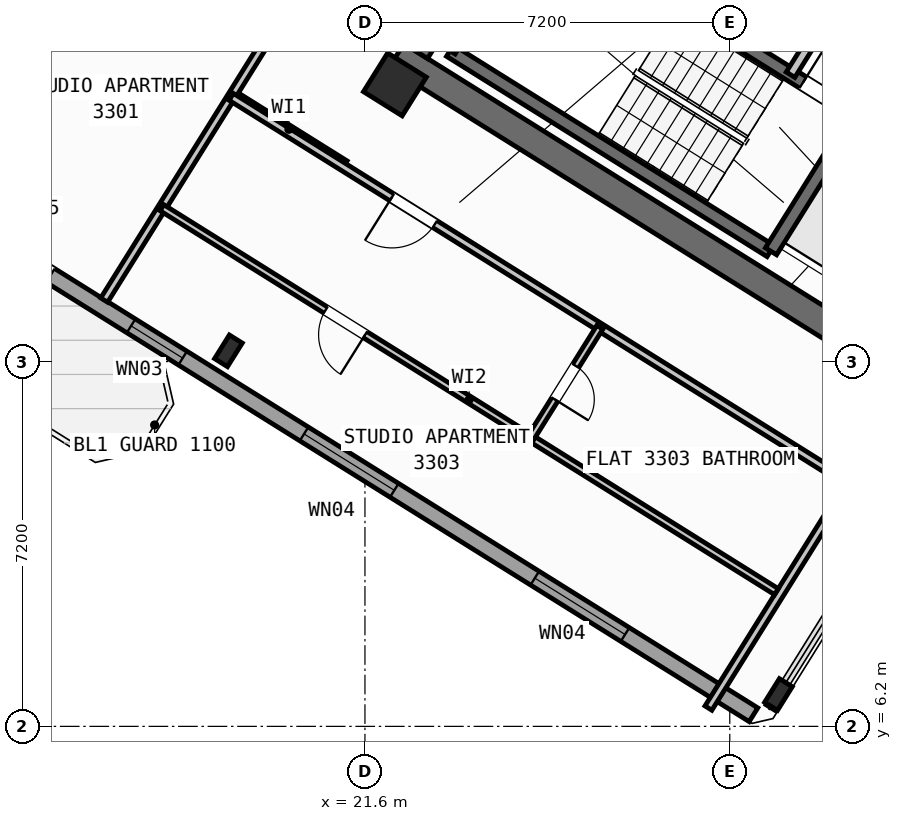
"""IFC4 building model, lengths in metres.
Left out: names, types, materials, properties, quantities, classifications, styles, units other than length and angle.
Written with IfcOpenShell. Run it as: python <this file> out.ifc"""

import sys

from ifc_helpers import new_model, si_unit, direction, frame, frame_2d, origin, origin_2d, place, context, subcontext, project, spatial, rectangle, hollow_rectangle, i_section, extrude, source, transform, mapped, element, fill, save


model = new_model("IFC4")
c1 = context("Model", 3, precision=1e-05, world=origin(), true_north=direction((0.0, 1.0)))
c2 = subcontext(c1, "Body", "Model", "MODEL_VIEW")
j1 = project(units=[si_unit("LENGTHUNIT", "METRE"), si_unit("PLANEANGLEUNIT", "RADIAN")], contexts=[c1])
p1 = place(None, origin())
s1 = spatial("IfcSite", under=j1, at=p1, CompositionType="ELEMENT")
p2 = place(p1, origin())
s2 = spatial("IfcBuilding", under=s1, at=p2, CompositionType="ELEMENT")
p3 = place(p2, frame((0.0, 0.0, 132.6)))
s3 = spatial("IfcBuildingStorey", under=s2, at=p3, CompositionType="ELEMENT", Elevation=132.6)
p4 = place(p3, frame((33.366, 12.477, 0.0), z_axis=(0.0, 0.0, 1.0), x_axis=(-0.848047359947, 0.529920442413, 0.0)))
e1 = element("IfcWall", 1, at=p4, inside=s3, PredefinedType="SHEAR", context=c2, shape_type="SweptSolid", body=[
    extrude(rectangle(XDim=13.14, YDim=0.55, at=frame_2d((6.57, 0.0))), origin(), (0.0, 0.0, 1.0), 3.32),
])
p5 = place(p3, frame((26.007, 24.976, 0.0), z_axis=(0.0, 0.0, 1.0), x_axis=(-0.529923795287, -0.848045264823, 0.0)))
e2 = element("IfcWall", 2, at=p5, inside=s3, PredefinedType="SHEAR", context=c2, shape_type="SweptSolid", body=[
    extrude(rectangle(XDim=6.425, YDim=0.55, at=frame_2d((3.212, 0.0))), origin(), (0.0, 0.0, 1.0), 3.32),
])
m1 = source(origin(), c2, "Body", "SweptSolid", [
    extrude(i_section(OverallWidth=0.3, OverallDepth=0.55, WebThickness=0.015, FlangeThickness=0.029, at=origin_2d()), origin(), (0.0, 0.0, 1.0), 3.6),
])
p6 = place(p3, frame((29.761, 6.829, 0.0), z_axis=(0.0, 0.0, 1.0), x_axis=(-0.848048096156, 0.529919264233, 0.0)))
e3 = element("IfcColumn", 3, at=p6, inside=s3, PredefinedType="COLUMN", context=c2, shape_type="MappedRepresentation", body=[
    mapped(m1, transform((0.0, 0.0, 0.0), scale=1.0)),
])
m2 = source(origin(), c2, "Body", "SweptSolid", [
    extrude(hollow_rectangle(XDim=0.9, YDim=0.9, WallThickness=0.036, at=origin_2d()), origin(), (0.0, 0.0, 1.0), 3.6),
])
p7 = place(p3, frame((22.191, 18.87, 0.0), z_axis=(0.0, 0.0, 1.0), x_axis=(-0.848048096156, 0.529919264233, 0.0)))
e4 = element("IfcColumn", 4, at=p7, inside=s3, PredefinedType="COLUMN", context=c2, shape_type="MappedRepresentation", body=[
    mapped(m2, transform((0.0, 0.0, 0.0), scale=1.0)),
])
p8 = place(p3, frame((18.906, 13.612, 0.0), z_axis=(0.0, 0.0, 1.0), x_axis=(-0.848048096156, 0.529919264233, 0.0)))
e5 = element("IfcColumn", 5, at=p8, inside=s3, PredefinedType="COLUMN", context=c2, shape_type="MappedRepresentation", body=[
    mapped(m1, transform((0.0, 0.0, 0.0), scale=1.0)),
])
p9 = place(p3, frame((29.268, 6.429, 0.0), z_axis=(0.0, 0.0, 1.0), x_axis=(-0.848049971435, 0.529916263149, 0.0)))
e6 = element("IfcWall", 6, at=p9, inside=s3, PredefinedType="STANDARD", context=c2, shape_type="SweptSolid", body=[
    extrude(rectangle(XDim=31.588, YDim=0.32, at=frame_2d((15.794, 0.0))), origin(), (0.0, 0.0, 1.0), 3.32),
])
p10 = place(p9, frame((16.362, 0.0, 0.0)))
e7 = element("IfcOpeningElement", 7, at=p10, cuts=e6, PredefinedType="OPENING", context=c2, shape_type="SweptSolid", body=[
    extrude(rectangle(XDim=1.2, YDim=2.15, at=frame_2d((0.6, 1.075))), frame((0.0, 0.17, 0.0), z_axis=(0.0, -1.0, 0.0), x_axis=(1.0, 0.0, 0.0)), (0.0, 0.0, 1.0), 0.34),
])
p11 = place(p9, frame((2.989, 0.0, 0.8)))
e8 = element("IfcOpeningElement", 8, at=p11, cuts=e6, PredefinedType="OPENING", context=c2, shape_type="SweptSolid", body=[
    extrude(rectangle(XDim=2.1, YDim=1.55, at=frame_2d((1.05, 0.775))), frame((0.0, 0.17, 0.0), z_axis=(0.0, -1.0, 0.0), x_axis=(1.0, 0.0, 0.0)), (0.0, 0.0, 1.0), 0.34),
])
p12 = place(p9, frame((8.359, 0.0, 0.8)))
e9 = element("IfcOpeningElement", 9, at=p12, cuts=e6, PredefinedType="OPENING", context=c2, shape_type="SweptSolid", body=[
    extrude(rectangle(XDim=2.1, YDim=1.55, at=frame_2d((1.05, 0.775))), frame((0.0, 0.17, 0.0), z_axis=(0.0, -1.0, 0.0), x_axis=(1.0, 0.0, 0.0)), (0.0, 0.0, 1.0), 0.34),
])
p13 = place(p9, frame((13.284, 0.0, 0.95)))
e10 = element("IfcOpeningElement", 10, at=p13, cuts=e6, PredefinedType="OPENING", context=c2, shape_type="SweptSolid", body=[
    extrude(rectangle(XDim=1.2, YDim=1.4, at=frame_2d((0.6, 0.7))), frame((0.0, 0.17, 0.0), z_axis=(0.0, -1.0, 0.0), x_axis=(1.0, 0.0, 0.0)), (0.0, 0.0, 1.0), 0.34),
])
p14 = place(p9, frame((20.39, 0.0, 0.95)))
e11 = element("IfcOpeningElement", 11, at=p14, cuts=e6, PredefinedType="OPENING", context=c2, shape_type="SweptSolid", body=[
    extrude(rectangle(XDim=1.2, YDim=1.4, at=frame_2d((0.6, 0.7))), frame((0.0, 0.17, 0.0), z_axis=(0.0, -1.0, 0.0), x_axis=(1.0, 0.0, 0.0)), (0.0, 0.0, 1.0), 0.34),
])
p15 = place(p9, frame((23.715, 0.0, 1.0)))
e12 = element("IfcOpeningElement", 12, at=p15, cuts=e6, PredefinedType="OPENING", context=c2, shape_type="SweptSolid", body=[
    extrude(rectangle(XDim=0.9, YDim=1.25, at=frame_2d((0.45, 0.625))), frame((0.0, 0.17, 0.0), z_axis=(0.0, -1.0, 0.0), x_axis=(1.0, 0.0, 0.0)), (0.0, 0.0, 1.0), 0.34),
])
p16 = place(p9, frame((27.481, 0.0, 0.8)))
e13 = element("IfcOpeningElement", 13, at=p16, cuts=e6, PredefinedType="OPENING", context=c2, shape_type="SweptSolid", body=[
    extrude(rectangle(XDim=2.1, YDim=1.55, at=frame_2d((1.05, 0.775))), frame((0.0, 0.17, 0.0), z_axis=(0.0, -1.0, 0.0), x_axis=(1.0, 0.0, 0.0)), (0.0, 0.0, 1.0), 0.34),
])
p17 = place(p3, frame((29.605, 15.581, 0.0), z_axis=(0.0, 0.0, 1.0), x_axis=(-0.848036911448, 0.529937163087, 0.0)))
e14 = element("IfcWall", 14, at=p17, inside=s3, PredefinedType="SHEAR", context=c2, shape_type="SweptSolid", body=[
    extrude(rectangle(XDim=7.46, YDim=0.26, at=frame_2d((3.73, 0.0))), origin(), (0.0, 0.0, 1.0), 3.32),
])
p18 = place(p3, frame((31.28, 18.261, 0.0), z_axis=(0.0, 0.0, 1.0), x_axis=(-0.848051618787, 0.529913626805, 0.0)))
e15 = element("IfcWall", 15, at=p18, inside=s3, PredefinedType="SHEAR", context=c2, shape_type="SweptSolid", body=[
    extrude(rectangle(XDim=7.46, YDim=0.26, at=frame_2d((3.73, 0.0))), origin(), (0.0, 0.0, 1.0), 3.32),
])
p19 = place(p18, frame((0.36, 0.0, 0.0)))
e16 = element("IfcOpeningElement", 16, at=p19, cuts=e15, PredefinedType="OPENING", context=c2, shape_type="SweptSolid", body=[
    extrude(rectangle(XDim=0.86, YDim=2.05, at=frame_2d((0.43, 1.025))), frame((0.0, 0.14, 0.0), z_axis=(0.0, -1.0, 0.0), x_axis=(1.0, 0.0, 0.0)), (0.0, 0.0, 1.0), 0.28),
])
p20 = place(p3, frame((31.288, 18.256, 0.0), z_axis=(0.0, 0.0, 1.0), x_axis=(-0.529943379326, -0.848033026897, 0.0)))
e17 = element("IfcWall", 17, at=p20, inside=s3, PredefinedType="SHEAR", context=c2, shape_type="SweptSolid", body=[
    extrude(rectangle(XDim=3.16, YDim=0.26, at=frame_2d((1.58, 0.0))), origin(), (0.0, 0.0, 1.0), 3.32),
])
p21 = place(p3, frame((24.945, 22.22, 0.0), z_axis=(0.0, 0.0, 1.0), x_axis=(-0.529908658664, -0.84805472316, 0.0)))
e18 = element("IfcWall", 18, at=p21, inside=s3, PredefinedType="SHEAR", context=c2, shape_type="SweptSolid", body=[
    extrude(rectangle(XDim=3.16, YDim=0.26, at=frame_2d((1.58, 0.0))), origin(), (0.0, 0.0, 1.0), 3.32),
])
p22 = place(p3, frame((31.525, 21.504, 0.0), z_axis=(0.0, 0.0, 1.0), x_axis=(-0.529907497854, -0.848055448493, 0.0)))
e19 = element("IfcWall", 19, at=p22, inside=s3, PredefinedType="STANDARD", context=c2, shape_type="SweptSolid", body=[
    extrude(rectangle(XDim=2.88, YDim=0.2, at=frame_2d((1.44, 0.0))), origin(), (0.0, 0.0, 1.0), 3.31),
])
p23 = place(p3, frame((21.206, 17.292, 0.0), z_axis=(0.0, 0.0, 1.0), x_axis=(-0.848050851465, 0.529914854792, 0.0)))
e20 = element("IfcWall", 20, at=p23, inside=s3, PredefinedType="PARTITIONING", context=c2, shape_type="SweptSolid", body=[
    extrude(rectangle(XDim=2.61, YDim=0.16, at=frame_2d((1.305, 0.0))), origin(), (0.0, 0.0, 1.0), 3.31),
])
p24 = place(p3, frame((24.588, 27.631, 0.0), z_axis=(0.0, 0.0, 1.0), x_axis=(-0.529914586043, -0.848051019396, 0.0)))
e21 = element("IfcWall", 21, at=p24, inside=s3, PredefinedType="PARTITIONING", context=c2, shape_type="SweptSolid", body=[
    extrude(rectangle(XDim=15.35, YDim=0.16, at=frame_2d((7.675, 0.0))), origin(), (0.0, 0.0, 1.0), 3.31),
])
p25 = place(p3, frame((16.519, 21.87, 0.0), z_axis=(0.0, 0.0, 1.0), x_axis=(-0.529922447305, -0.848046107144, 0.0)))
e22 = element("IfcWall", 22, at=p25, inside=s3, PredefinedType="PARTITIONING", context=c2, shape_type="SweptSolid", body=[
    extrude(rectangle(XDim=5.451, YDim=0.16, at=frame_2d((2.726, 0.0))), origin(), (0.0, 0.0, 1.0), 2.745),
])
p26 = place(p3, frame((16.112, 28.706, 0.0), z_axis=(0.0, 0.0, 1.0), x_axis=(-0.529929676091, -0.848041590017, 0.0)))
e23 = element("IfcWall", 23, at=p26, inside=s3, PredefinedType="PARTITIONING", context=c2, shape_type="SweptSolid", body=[
    extrude(rectangle(XDim=12.04, YDim=0.11, at=frame_2d((6.02, 0.0))), origin(), (0.0, 0.0, 1.0), 3.31),
])
p27 = place(p26, frame((0.35, 0.0, 0.0)))
e24 = element("IfcOpeningElement", 24, at=p27, cuts=e23, PredefinedType="OPENING", context=c2, shape_type="SweptSolid", body=[
    extrude(rectangle(XDim=0.92, YDim=2.08, at=frame_2d((0.46, 1.04))), frame((0.0, 0.065, 0.0), z_axis=(0.0, -1.0, 0.0), x_axis=(1.0, 0.0, 0.0)), (0.0, 0.0, 1.0), 0.13),
])
p28 = place(p3, frame((32.164, 10.374, 0.0), z_axis=(0.0, 0.0, 1.0), x_axis=(-0.848044107957, 0.529925646633, 0.0)))
e25 = element("IfcWall", 25, at=p28, inside=s3, PredefinedType="PARTITIONING", context=c2, shape_type="SweptSolid", body=[
    extrude(rectangle(XDim=15.57, YDim=0.16, at=frame_2d((7.785, 0.0))), origin(), (0.0, 0.0, 1.0), 3.31),
])
p29 = place(p28, frame((10.83, 0.0, 0.0)))
e26 = element("IfcOpeningElement", 26, at=p29, cuts=e25, PredefinedType="OPENING", context=c2, shape_type="SweptSolid", body=[
    extrude(rectangle(XDim=1.0, YDim=2.1, at=frame_2d((0.5, 1.05))), frame((0.0, 0.09, 0.0), z_axis=(0.0, -1.0, 0.0), x_axis=(1.0, 0.0, 0.0)), (0.0, 0.0, 1.0), 0.18),
])
p30 = place(p3, frame((31.282, 11.208, 0.0), z_axis=(0.0, 0.0, 1.0), x_axis=(-0.529938869374, -0.84803584519, 0.0)))
e27 = element("IfcWall", 27, at=p30, inside=s3, PredefinedType="PARTITIONING", context=c2, shape_type="SweptSolid", body=[
    extrude(rectangle(XDim=5.48, YDim=0.16, at=frame_2d((2.74, 0.0))), origin(), (0.0, 0.0, 1.0), 3.31),
])
p31 = place(p3, frame((29.72, 8.859, 0.0), z_axis=(0.0, 0.0, 1.0), x_axis=(-0.848049134363, 0.529917602752, 0.0)))
e28 = element("IfcWall", 28, at=p31, inside=s3, PredefinedType="PLUMBINGWALL", context=c2, shape_type="SweptSolid", body=[
    extrude(rectangle(XDim=14.3, YDim=0.14, at=frame_2d((7.15, 0.0))), origin(), (0.0, 0.0, 1.0), 3.31),
])
p32 = place(p31, frame((9.57, 0.0, 0.0)))
e29 = element("IfcOpeningElement", 29, at=p32, cuts=e28, PredefinedType="OPENING", context=c2, shape_type="SweptSolid", body=[
    extrude(rectangle(XDim=0.92, YDim=2.08, at=frame_2d((0.46, 1.04))), frame((0.0, 0.08, 0.0), z_axis=(0.0, -1.0, 0.0), x_axis=(1.0, 0.0, 0.0)), (0.0, 0.0, 1.0), 0.16),
])
p33 = place(p3, frame((26.237, 14.078, 0.0), z_axis=(0.0, 0.0, 1.0), x_axis=(-0.52995640672, -0.848024885824, 0.0)))
e30 = element("IfcWall", 30, at=p33, inside=s3, PredefinedType="PLUMBINGWALL", context=c2, shape_type="SweptSolid", body=[
    extrude(rectangle(XDim=2.58, YDim=0.14, at=frame_2d((1.29, 0.0))), origin(), (0.0, 0.0, 1.0), 3.31),
])
p34 = place(p33, frame((0.9, 0.0, 0.0)))
e31 = element("IfcOpeningElement", 31, at=p34, cuts=e30, PredefinedType="OPENING", context=c2, shape_type="SweptSolid", body=[
    extrude(rectangle(XDim=0.78, YDim=2.05, at=frame_2d((0.39, 1.025))), frame((0.0, 0.08, 0.0), z_axis=(0.0, -1.0, 0.0), x_axis=(1.0, 0.0, 0.0)), (0.0, 0.0, 1.0), 0.16),
])
m3 = source(origin(), c2, "Body", "SweptSolid", [
    extrude(rectangle(XDim=2.1, YDim=1.55, at=frame_2d((1.05, 0.775))), frame((0.0, 0.03, 0.0), z_axis=(0.0, -1.0, 0.0), x_axis=(1.0, 0.0, 0.0)), (0.0, 0.0, 1.0), 0.06),
])
p35 = place(p11, origin())
e32 = element("IfcWindow", 32, at=p35, inside=s3, PartitioningType="SINGLE_PANEL", PredefinedType="WINDOW", context=c2, shape_type="MappedRepresentation", body=[
    mapped(m3, transform((0.0, 0.0, 0.0), scale=1.0)),
])
fill(e8, e32)
p36 = place(p12, origin())
e33 = element("IfcWindow", 33, at=p36, inside=s3, PartitioningType="SINGLE_PANEL", PredefinedType="WINDOW", context=c2, shape_type="MappedRepresentation", body=[
    mapped(m3, transform((0.0, 0.0, 0.0), scale=1.0)),
])
fill(e9, e33)
m4 = source(origin(), c2, "Body", "SweptSolid", [
    extrude(rectangle(XDim=1.2, YDim=1.4, at=frame_2d((0.6, 0.7))), frame((0.0, 0.03, 0.0), z_axis=(0.0, -1.0, 0.0), x_axis=(1.0, 0.0, 0.0)), (0.0, 0.0, 1.0), 0.06),
])
p37 = place(p13, origin())
e34 = element("IfcWindow", 34, at=p37, inside=s3, PartitioningType="SINGLE_PANEL", PredefinedType="WINDOW", context=c2, shape_type="MappedRepresentation", body=[
    mapped(m4, transform((0.0, 0.0, 0.0), scale=1.0)),
])
fill(e10, e34)
m5 = source(origin(), c2, "Body", "SweptSolid", [
    extrude(rectangle(XDim=0.86, YDim=2.05, at=frame_2d((0.43, 1.025))), frame((0.0, 0.025, 0.0), z_axis=(0.0, -1.0, 0.0), x_axis=(1.0, 0.0, 0.0)), (0.0, 0.0, 1.0), 0.05),
])
p38 = place(p19, frame((0.86, 0.0, 0.0), z_axis=(0.0, 0.0, 1.0), x_axis=(-1.0, 0.0, 0.0)))
e35 = element("IfcDoor", 35, at=p38, inside=s3, OperationType="SINGLE_SWING_LEFT", PredefinedType="DOOR", context=c2, shape_type="MappedRepresentation", body=[
    mapped(m5, transform((0.0, 0.0, 0.0), scale=1.0)),
])
fill(e16, e35)
m6 = source(origin(), c2, "Body", "SweptSolid", [
    extrude(rectangle(XDim=1.0, YDim=2.1, at=frame_2d((0.5, 1.05))), frame((0.0, 0.025, 0.0), z_axis=(0.0, -1.0, 0.0), x_axis=(1.0, 0.0, 0.0)), (0.0, 0.0, 1.0), 0.05),
])
p39 = place(p29, origin())
e36 = element("IfcDoor", 36, at=p39, inside=s3, OperationType="SINGLE_SWING_RIGHT", PredefinedType="DOOR", context=c2, shape_type="MappedRepresentation", body=[
    mapped(m6, transform((0.0, 0.0, 0.0), scale=1.0)),
])
fill(e26, e36)
m7 = source(origin(), c2, "Body", "SweptSolid", [
    extrude(rectangle(XDim=0.92, YDim=2.08, at=frame_2d((0.46, 1.04))), frame((0.0, 0.025, 0.0), z_axis=(0.0, -1.0, 0.0), x_axis=(1.0, 0.0, 0.0)), (0.0, 0.0, 1.0), 0.05),
])
p40 = place(p32, origin())
e37 = element("IfcDoor", 37, at=p40, inside=s3, OperationType="SINGLE_SWING_LEFT", PredefinedType="DOOR", context=c2, shape_type="MappedRepresentation", body=[
    mapped(m7, transform((0.0, 0.0, 0.0), scale=1.0)),
])
fill(e29, e37)
m8 = source(origin(), c2, "Body", "SweptSolid", [
    extrude(rectangle(XDim=0.78, YDim=2.05, at=frame_2d((0.39, 1.025))), frame((0.0, 0.025, 0.0), z_axis=(0.0, -1.0, 0.0), x_axis=(1.0, 0.0, 0.0)), (0.0, 0.0, 1.0), 0.05),
])
p41 = place(p34, origin())
e38 = element("IfcDoor", 38, at=p41, inside=s3, OperationType="SINGLE_SWING_RIGHT", PredefinedType="DOOR", context=c2, shape_type="MappedRepresentation", body=[
    mapped(m8, transform((0.0, 0.0, 0.0), scale=1.0)),
])
fill(e31, e38)
save(model, sys.argv[1])
